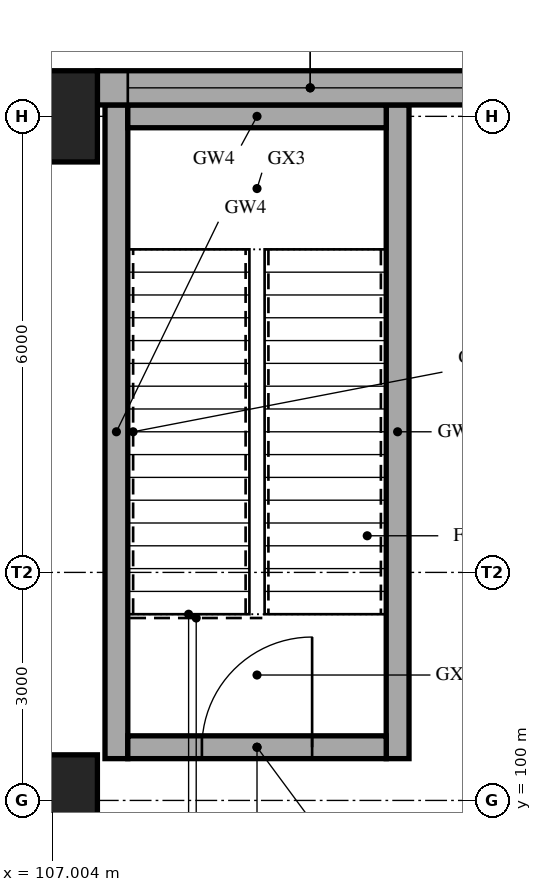
"""IFC4 building model, lengths in metres.
Left out: names, types, materials, properties, quantities, classifications, styles, units other than length and angle.
Written with IfcOpenShell. Run it as: python <this file> out.ifc"""

import sys

from ifc_helpers import new_model, si_unit, direction, frame, frame_2d, origin, origin_2d, place, context, subcontext, project, spatial, rectangle, extrude, element, fill, save


model = new_model("IFC4")
c1 = context("Model", 3, precision=1e-05, world=origin(), true_north=direction((0.0, 1.0)))
c2 = subcontext(c1, "Body", "Model", "MODEL_VIEW")
j1 = project(units=[si_unit("LENGTHUNIT", "METRE"), si_unit("PLANEANGLEUNIT", "RADIAN")], contexts=[c1])
p1 = place(None, origin())
s1 = spatial("IfcSite", under=j1, at=p1, CompositionType="ELEMENT")
p2 = place(p1, origin())
s2 = spatial("IfcBuilding", under=s1, at=p2, CompositionType="ELEMENT")
p3 = place(p2, frame((0.0, 0.0, 5.0)))
s3 = spatial("IfcBuildingStorey", under=s2, at=p3, CompositionType="ELEMENT", Elevation=5.0)
for number, where, z_axis, x_axis in (
    (1, (106.8, 100.0, 0.0), (0.0, 0.0, 1.0), (1.0, 0.0, 0.0)),
    (2, (106.8, 109.0, 0.0), (0.0, 0.0, 1.0), (1.0, 0.0, 0.0)),
):
    element("IfcColumn", number, at=place(p3, frame(where, z_axis=z_axis, x_axis=x_axis)), inside=s3, PredefinedType="COLUMN", context=c2, shape_type="SweptSolid", body=[
        extrude(rectangle(XDim=1.6, YDim=1.2, at=origin_2d()), origin(), (0.0, 0.0, 1.0), 5.0),
    ])
for number, where, z_axis, x_axis in (
    (3, (107.85, 100.55, 0.0), (0.0, 0.0, 1.0), (0.0, 1.0, 0.0)),
    (4, (111.55, 100.55, 0.0), (0.0, 0.0, 1.0), (0.0, 1.0, 0.0)),
):
    element("IfcWall", number, at=place(p3, frame(where, z_axis=z_axis, x_axis=x_axis)), inside=s3, PredefinedType="SHEAR", context=c2, shape_type="SweptSolid", body=[
        extrude(rectangle(XDim=8.6, YDim=0.3, at=frame_2d((4.3, 0.0))), origin(), (0.0, 0.0, 1.0), 5.0),
    ])
p4 = place(p3, frame((108.0, 100.7, 0.0), z_axis=(0.0, 0.0, 1.0), x_axis=(1.0, 0.0, 0.0)))
e5 = element("IfcWall", 5, at=p4, inside=s3, PredefinedType="SHEAR", context=c2, shape_type="SweptSolid", body=[
    extrude(rectangle(XDim=3.4, YDim=0.3, at=frame_2d((1.7, 0.0))), origin(), (0.0, 0.0, 1.0), 5.0),
])
p5 = place(p4, frame((0.975, 0.0, 0.0)))
e6 = element("IfcOpeningElement", 6, at=p5, cuts=e5, PredefinedType="OPENING", context=c2, shape_type="SweptSolid", body=[
    extrude(rectangle(XDim=1.45, YDim=2.1, at=frame_2d((0.725, 1.05))), frame((0.0, 0.16, 0.0), z_axis=(0.0, -1.0, 0.0), x_axis=(1.0, 0.0, 0.0)), (0.0, 0.0, 1.0), 0.32),
])
p6 = place(p3, frame((108.0, 109.0, 0.0), z_axis=(0.0, 0.0, 1.0), x_axis=(1.0, 0.0, 0.0)))
e7 = element("IfcWall", 7, at=p6, inside=s3, PredefinedType="SHEAR", context=c2, shape_type="SweptSolid", body=[
    extrude(rectangle(XDim=3.4, YDim=0.3, at=frame_2d((1.7, 0.0))), origin(), (0.0, 0.0, 1.0), 5.0),
])
p7 = place(p3, frame((107.6, 109.375, 0.0), z_axis=(0.0, 0.0, 1.0), x_axis=(1.0, 0.0, 0.0)))
e8 = element("IfcWall", 8, at=p7, inside=s3, PredefinedType="SOLIDWALL", context=c2, shape_type="SweptSolid", body=[
    extrude(rectangle(XDim=5.6, YDim=0.45, at=frame_2d((2.8, 0.0))), origin(), (0.0, 0.0, 1.0), 5.0),
])
p8 = place(p7, frame((0.4, 0.0, 0.9)))
e9 = element("IfcOpeningElement", 9, at=p8, cuts=e8, PredefinedType="OPENING", context=c2, shape_type="SweptSolid", body=[
    extrude(rectangle(XDim=4.8, YDim=3.0, at=frame_2d((2.4, 1.5))), frame((0.0, 0.235, 0.0), z_axis=(0.0, -1.0, 0.0), x_axis=(1.0, 0.0, 0.0)), (0.0, 0.0, 1.0), 0.47),
])
p9 = place(p8, origin())
e10 = element("IfcWindow", 10, at=p9, inside=s3, PartitioningType="SINGLE_PANEL", PredefinedType="WINDOW", context=c2, shape_type="SweptSolid", body=[
    extrude(rectangle(XDim=4.8, YDim=3.0, at=frame_2d((2.4, 1.5))), frame((0.0, 0.03, 0.0), z_axis=(0.0, -1.0, 0.0), x_axis=(1.0, 0.0, 0.0)), (0.0, 0.0, 1.0), 0.06),
])
fill(e9, e10)
p10 = place(p5, origin())
e11 = element("IfcDoor", 11, at=p10, inside=s3, OperationType="SINGLE_SWING_RIGHT", PredefinedType="DOOR", context=c2, shape_type="SweptSolid", body=[
    extrude(rectangle(XDim=1.45, YDim=2.1, at=frame_2d((0.725, 1.05))), frame((0.0, 0.025, 0.0), z_axis=(0.0, -1.0, 0.0), x_axis=(1.0, 0.0, 0.0)), (0.0, 0.0, 1.0), 0.05),
])
fill(e6, e11)
save(model, sys.argv[1])
